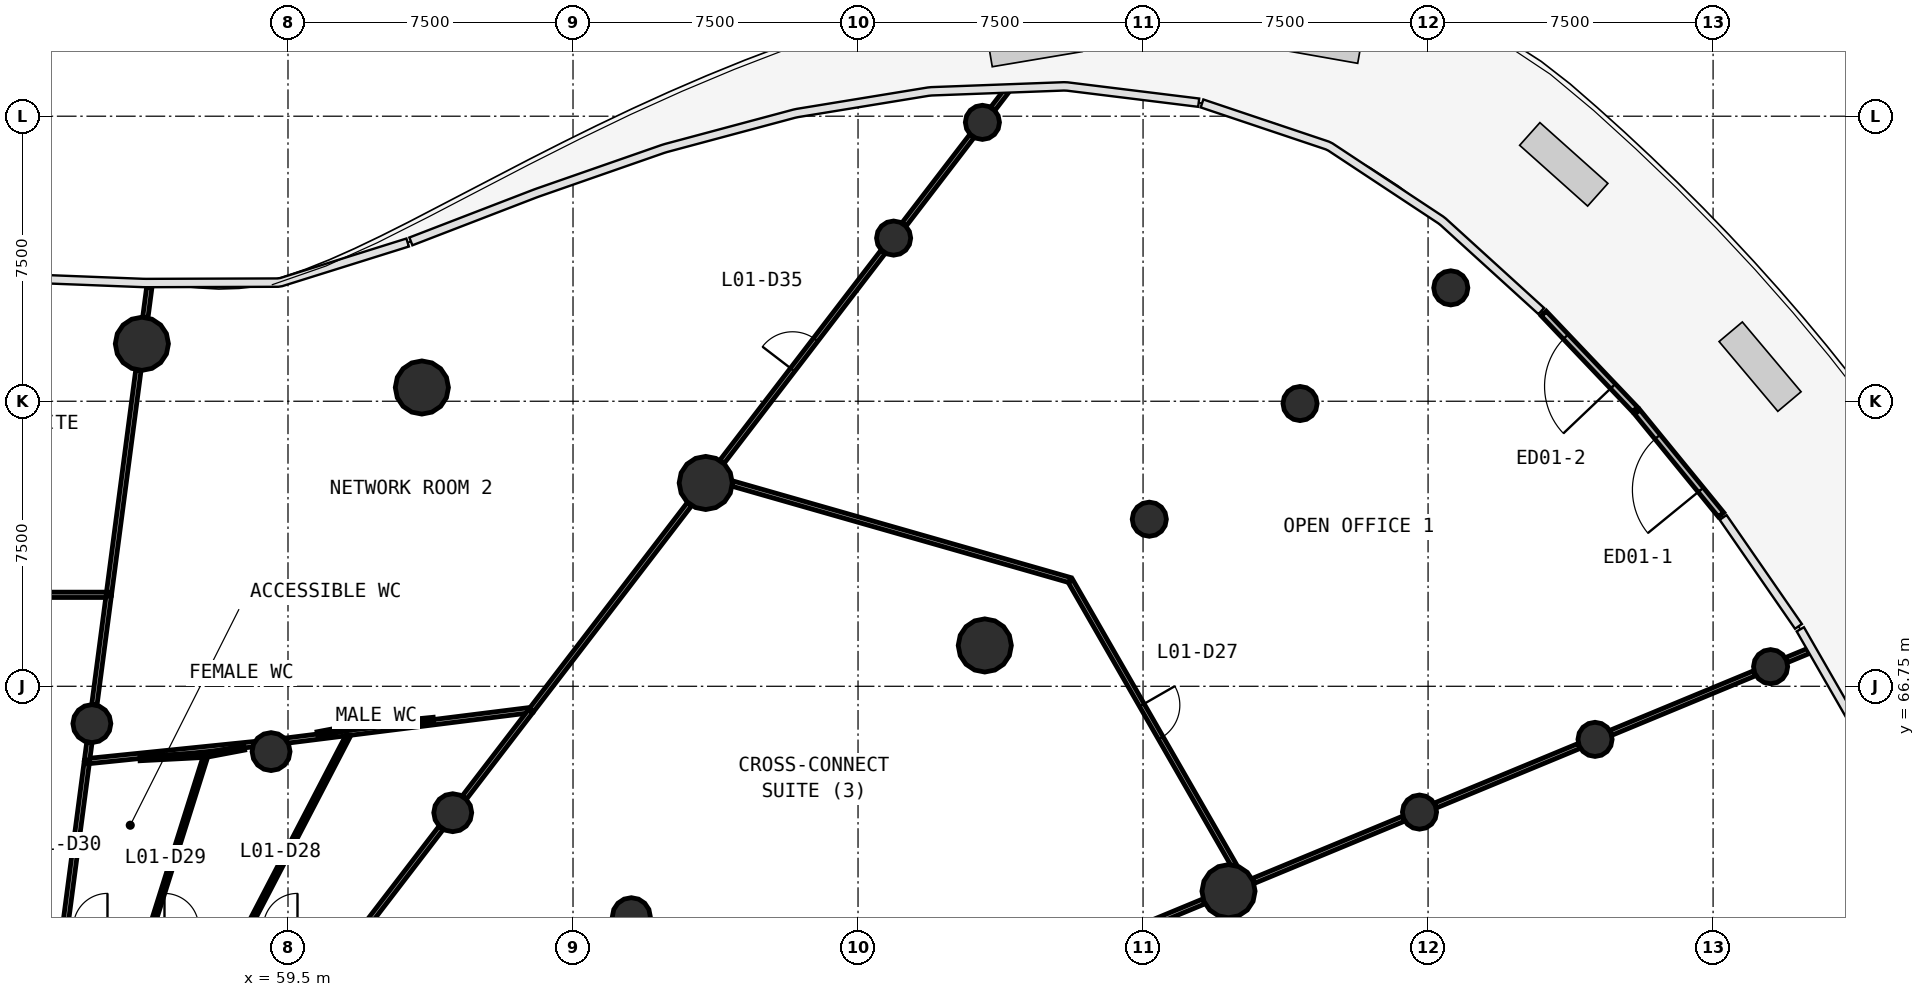
"""IFC4 building model, lengths in metres.
Left out: names, types, materials, properties, quantities, classifications, styles, units other than length and angle.
Written with IfcOpenShell. Run it as: python <this file> out.ifc"""

import sys

from ifc_helpers import new_model, si_unit, direction, frame, frame_2d, origin, origin_2d, place, context, subcontext, project, spatial, rectangle, circle, extrude, source, transform, mapped, element, fill, save


model = new_model("IFC4")
c1 = context("Model", 3, precision=1e-05, world=origin(), true_north=direction((0.0, 1.0)))
c2 = subcontext(c1, "Body", "Model", "MODEL_VIEW")
j1 = project(units=[si_unit("LENGTHUNIT", "METRE"), si_unit("PLANEANGLEUNIT", "RADIAN")], contexts=[c1])
p1 = place(None, origin())
s1 = spatial("IfcSite", under=j1, at=p1, CompositionType="ELEMENT")
p2 = place(p1, origin())
s2 = spatial("IfcBuilding", under=s1, at=p2, CompositionType="ELEMENT")
p3 = place(p2, frame((0.0, 0.0, 5.0)))
s3 = spatial("IfcBuildingStorey", under=s2, at=p3, CompositionType="ELEMENT", Elevation=5.0)
m1 = source(origin(), c2, "Body", "SweptSolid", [
    extrude(circle(Radius=0.7, at=origin_2d()), origin(), (0.0, 0.0, 1.0), 4.4),
])
for number, where, z_axis, x_axis in (
    (1, (84.249, 61.358, 0.0), (0.0, 0.0, 1.0), (1.0, 0.0, 0.0)),
    (2, (77.836, 67.824, 0.0), (0.0, 0.0, 1.0), (1.0, 0.0, 0.0)),
    (3, (70.492, 72.1, 0.0), (0.0, 0.0, 1.0), (1.0, 0.0, 0.0)),
    (4, (63.023, 74.611, 0.0), (0.0, 0.0, 1.0), (1.0, 0.0, 0.0)),
    (5, (55.655, 75.761, 0.0), (0.0, 0.0, 1.0), (1.0, 0.0, 0.0)),
):
    element("IfcColumn", number, at=place(p3, frame(where, z_axis=z_axis, x_axis=x_axis)), inside=s3, PredefinedType="COLUMN", context=c2, shape_type="MappedRepresentation", body=[
        mapped(m1, transform((0.0, 0.0, 0.0), scale=1.0)),
    ])
m2 = source(origin(), c2, "Body", "SweptSolid", [
    extrude(circle(Radius=0.5, at=origin_2d()), origin(), (0.0, 0.0, 1.0), 4.4),
])
for number, where, z_axis, x_axis in (
    (6, (68.535, 60.688, 0.0), (0.0, 0.0, 1.0), (1.0, 0.0, 0.0)),
    (7, (63.835, 63.424, 0.0), (0.0, 0.0, 1.0), (1.0, 0.0, 0.0)),
    (8, (59.055, 65.031, 0.0), (0.0, 0.0, 1.0), (1.0, 0.0, 0.0)),
    (9, (54.339, 65.767, 0.0), (0.0, 0.0, 1.0), (1.0, 0.0, 0.0)),
):
    element("IfcColumn", number, at=place(p3, frame(where, z_axis=z_axis, x_axis=x_axis)), inside=s3, PredefinedType="COLUMN", context=c2, shape_type="MappedRepresentation", body=[
        mapped(m2, transform((0.0, 0.0, 0.0), scale=1.0)),
    ])
m3 = source(origin(), c2, "Body", "SweptSolid", [
    extrude(circle(Radius=0.45, at=origin_2d()), origin(), (0.0, 0.0, 1.0), 4.05),
])
for number, where, z_axis, x_axis in (
    (10, (98.513, 67.266, 0.0), (0.0, 0.0, 1.0), (1.0, 0.0, 0.0)),
    (11, (90.098, 77.233, 0.0), (0.0, 0.0, 1.0), (1.0, 0.0, 0.0)),
    (12, (77.773, 81.588, 0.0), (0.0, 0.0, 1.0), (1.0, 0.0, 0.0)),
):
    element("IfcColumn", number, at=place(p3, frame(where, z_axis=z_axis, x_axis=x_axis)), inside=s3, PredefinedType="COLUMN", context=c2, shape_type="MappedRepresentation", body=[
        mapped(m3, transform((0.0, 0.0, 0.0), scale=1.0)),
    ])
m4 = source(origin(), c2, "Body", "SweptSolid", [
    extrude(circle(Radius=0.45, at=origin_2d()), origin(), (0.0, 0.0, 1.0), 4.4),
])
for number, where, z_axis, x_axis in (
    (13, (93.894, 65.353, 0.0), (0.0, 0.0, 1.0), (1.0, 0.0, 0.0)),
    (14, (86.131, 74.19, 0.0), (0.0, 0.0, 1.0), (1.0, 0.0, 0.0)),
    (15, (75.436, 78.543, 0.0), (0.0, 0.0, 1.0), (1.0, 0.0, 0.0)),
    (16, (89.275, 63.44, 0.0), (0.0, 0.0, 1.0), (1.0, 0.0, 0.0)),
    (17, (82.165, 71.146, 0.0), (0.0, 0.0, 1.0), (1.0, 0.0, 0.0)),
):
    element("IfcColumn", number, at=place(p3, frame(where, z_axis=z_axis, x_axis=x_axis)), inside=s3, PredefinedType="COLUMN", context=c2, shape_type="MappedRepresentation", body=[
        mapped(m4, transform((0.0, 0.0, 0.0), scale=1.0)),
    ])
p4 = place(p3, frame((97.21, 71.265, 0.0), z_axis=(0.0, 0.0, 1.0), x_axis=(-0.632333608818, 0.77469620314, 0.0)))
e18 = element("IfcWall", 18, at=p4, inside=s3, PredefinedType="STANDARD", context=c2, shape_type="SweptSolid", body=[
    extrude(rectangle(XDim=3.486, YDim=0.18, at=frame_2d((1.743, 0.0))), origin(), (0.0, 0.0, 1.0), 4.05),
])
p5 = place(p4, frame((0.843, 0.0, 0.0)))
e19 = element("IfcOpeningElement", 19, at=p5, cuts=e18, PredefinedType="OPENING", context=c2, shape_type="SweptSolid", body=[
    extrude(rectangle(XDim=1.8, YDim=2.4, at=frame_2d((0.9, 1.2))), frame((0.0, 0.1, 0.0), z_axis=(0.0, -1.0, 0.0), x_axis=(1.0, 0.0, 0.0)), (0.0, 0.0, 1.0), 0.2),
])
p6 = place(p3, frame((94.946, 74.033, 0.0), z_axis=(0.0, 0.0, 1.0), x_axis=(-0.689168934046, 0.724600704075, 0.0)))
e20 = element("IfcWall", 20, at=p6, inside=s3, PredefinedType="STANDARD", context=c2, shape_type="SweptSolid", body=[
    extrude(rectangle(XDim=3.487, YDim=0.18, at=frame_2d((1.743, 0.0))), origin(), (0.0, 0.0, 1.0), 4.05),
])
p7 = place(p6, frame((0.843, 0.0, 0.0)))
e21 = element("IfcOpeningElement", 21, at=p7, cuts=e20, PredefinedType="OPENING", context=c2, shape_type="SweptSolid", body=[
    extrude(rectangle(XDim=1.8, YDim=2.4, at=frame_2d((0.9, 1.2))), frame((0.0, 0.1, 0.0), z_axis=(0.0, -1.0, 0.0), x_axis=(1.0, 0.0, 0.0)), (0.0, 0.0, 1.0), 0.2),
])
p8 = place(p3, frame((80.076, 69.544, 0.0), z_axis=(0.0, 0.0, 1.0), x_axis=(-0.961447102661, 0.27498994306, 0.0)))
e22 = element("IfcWall", 22, at=p8, inside=s3, PredefinedType="PARTITIONING", context=c2, shape_type="SweptSolid", body=[
    extrude(rectangle(XDim=9.236, YDim=0.14, at=frame_2d((4.618, 0.0))), origin(), (0.0, 0.0, 1.0), 3.25),
])
p9 = place(p3, frame((80.091, 69.518, 0.0), z_axis=(0.0, 0.0, 1.0), x_axis=(0.498474851257, -0.866904160023, 0.0)))
e23 = element("IfcWall", 23, at=p9, inside=s3, PredefinedType="PARTITIONING", context=c2, shape_type="SweptSolid", body=[
    extrude(rectangle(XDim=8.615, YDim=0.14, at=frame_2d((4.308, 0.0))), origin(), (0.0, 0.0, 1.0), 3.25),
])
p10 = place(p9, frame((3.765, 0.0, 0.0)))
e24 = element("IfcOpeningElement", 24, at=p10, cuts=e23, PredefinedType="OPENING", context=c2, shape_type="SweptSolid", body=[
    extrude(rectangle(XDim=1.0, YDim=2.1, at=frame_2d((0.5, 1.05))), frame((0.0, 0.08, 0.0), z_axis=(0.0, -1.0, 0.0), x_axis=(1.0, 0.0, 0.0)), (0.0, 0.0, 1.0), 0.16),
])
p11 = place(p3, frame((70.921, 72.658, 0.0), z_axis=(0.0, 0.0, 1.0), x_axis=(0.608788506125, 0.793332562555, 0.0)))
e25 = element("IfcWall", 25, at=p11, inside=s3, PredefinedType="PARTITIONING", context=c2, shape_type="SweptSolid", body=[
    extrude(rectangle(XDim=6.963, YDim=0.14, at=frame_2d((3.481, 0.0))), origin(), (0.0, 0.0, 1.0), 3.25),
])
p12 = place(p11, frame((3.05, 0.0, 0.0)))
e26 = element("IfcOpeningElement", 26, at=p12, cuts=e25, PredefinedType="OPENING", context=c2, shape_type="SweptSolid", body=[
    extrude(rectangle(XDim=1.0, YDim=2.1, at=frame_2d((0.5, 1.05))), frame((0.0, 0.08, 0.0), z_axis=(0.0, -1.0, 0.0), x_axis=(1.0, 0.0, 0.0)), (0.0, 0.0, 1.0), 0.16),
])
p13 = place(p3, frame((65.909, 66.127, 0.0), z_axis=(0.0, 0.0, 1.0), x_axis=(0.608773229352, 0.79334428543, 0.0)))
e27 = element("IfcWall", 27, at=p13, inside=s3, PredefinedType="PARTITIONING", context=c2, shape_type="SweptSolid", body=[
    extrude(rectangle(XDim=6.824, YDim=0.14, at=frame_2d((3.412, 0.0))), origin(), (0.0, 0.0, 1.0), 3.25),
])
p14 = place(p3, frame((65.88, 66.124, 0.0), z_axis=(0.0, 0.0, 1.0), x_axis=(-0.992269737838, -0.124099828249, 0.0)))
e28 = element("IfcWall", 28, at=p14, inside=s3, PredefinedType="PARTITIONING", context=c2, shape_type="SweptSolid", body=[
    extrude(rectangle(XDim=6.463, YDim=0.14, at=frame_2d((3.231, 0.0))), origin(), (0.0, 0.0, 1.0), 3.25),
])
p15 = place(p3, frame((54.785, 69.157, 0.0), z_axis=(0.0, 0.0, 1.0), x_axis=(0.130523417799, 0.991445226629, 0.0)))
e29 = element("IfcWall", 29, at=p15, inside=s3, PredefinedType="PARTITIONING", context=c2, shape_type="SweptSolid", body=[
    extrude(rectangle(XDim=5.958, YDim=0.14, at=frame_2d((2.979, 0.0))), origin(), (0.0, 0.0, 1.0), 3.25),
])
p16 = place(p3, frame((49.245, 69.157, 0.0), z_axis=(0.0, 0.0, 1.0), x_axis=(1.0, 0.0, 0.0)))
e30 = element("IfcWall", 30, at=p16, inside=s3, PredefinedType="PARTITIONING", context=c2, shape_type="SweptSolid", body=[
    extrude(rectangle(XDim=5.511, YDim=0.14, at=frame_2d((2.755, 0.0))), origin(), (0.0, 0.0, 1.0), 3.25),
])
p17 = place(p16, frame((2.261, 0.0, 0.0)))
e31 = element("IfcOpeningElement", 31, at=p17, cuts=e30, PredefinedType="OPENING", context=c2, shape_type="SweptSolid", body=[
    extrude(rectangle(XDim=1.0, YDim=2.1, at=frame_2d((0.5, 1.05))), frame((0.0, 0.08, 0.0), z_axis=(0.0, -1.0, 0.0), x_axis=(1.0, 0.0, 0.0)), (0.0, 0.0, 1.0), 0.16),
])
p18 = place(p3, frame((78.669, 59.047, 0.0), z_axis=(0.0, 0.0, 1.0), x_axis=(0.923891330959, 0.382654947151, 0.0)))
e32 = element("IfcWall", 32, at=p18, inside=s3, PredefinedType="PARTITIONING", context=c2, shape_type="SweptSolid", body=[
    extrude(rectangle(XDim=5.334, YDim=0.14, at=frame_2d((2.667, 0.0))), origin(), (0.0, 0.0, 1.0), 3.25),
])
p19 = place(p3, frame((53.644, 60.49, 0.0), z_axis=(0.0, 0.0, 1.0), x_axis=(0.130555258319, 0.991441034316, 0.0)))
e33 = element("IfcWall", 33, at=p19, inside=s3, PredefinedType="PARTITIONING", context=c2, shape_type="SweptSolid", body=[
    extrude(rectangle(XDim=4.325, YDim=0.14, at=frame_2d((2.163, 0.0))), origin(), (0.0, 0.0, 1.0), 3.25),
])
p20 = place(p3, frame((58.588, 65.225, 0.0), z_axis=(0.0, 0.0, 1.0), x_axis=(-0.994844610693, -0.101411047601, 0.0)))
e34 = element("IfcWall", 34, at=p20, inside=s3, PredefinedType="PARTITIONING", context=c2, shape_type="SweptSolid", body=[
    extrude(rectangle(XDim=4.372, YDim=0.14, at=frame_2d((2.186, 0.0))), origin(), (0.0, 0.0, 1.0), 3.25),
])
p21 = place(p3, frame((84.9, 61.628, 0.0), z_axis=(0.0, 0.0, 1.0), x_axis=(0.923871522787, 0.382702768979, 0.0)))
e35 = element("IfcWall", 35, at=p21, inside=s3, PredefinedType="PARTITIONING", context=c2, shape_type="SweptSolid", body=[
    extrude(rectangle(XDim=4.28, YDim=0.14, at=frame_2d((2.14, 0.0))), origin(), (0.0, 0.0, 1.0), 3.25),
])
p22 = place(p3, frame((94.314, 65.527, 0.0), z_axis=(0.0, 0.0, 1.0), x_axis=(0.923874959136, 0.382694473284, 0.0)))
e36 = element("IfcWall", 36, at=p22, inside=s3, PredefinedType="PARTITIONING", context=c2, shape_type="SweptSolid", body=[
    extrude(rectangle(XDim=4.09, YDim=0.14, at=frame_2d((2.045, 0.0))), origin(), (0.0, 0.0, 1.0), 3.25),
])
p23 = place(p3, frame((89.695, 63.614, 0.0), z_axis=(0.0, 0.0, 1.0), x_axis=(0.92386621601, 0.382715579661, 0.0)))
e37 = element("IfcWall", 37, at=p23, inside=s3, PredefinedType="PARTITIONING", context=c2, shape_type="SweptSolid", body=[
    extrude(rectangle(XDim=4.09, YDim=0.14, at=frame_2d((2.045, 0.0))), origin(), (0.0, 0.0, 1.0), 3.25),
])
p24 = place(p3, frame((61.584, 60.49, 0.0), z_axis=(0.0, 0.0, 1.0), x_axis=(0.60874605662, 0.793365135703, 0.0)))
e38 = element("IfcWall", 38, at=p24, inside=s3, PredefinedType="PARTITIONING", context=c2, shape_type="SweptSolid", body=[
    extrude(rectangle(XDim=3.194, YDim=0.14, at=frame_2d((1.597, 0.0))), origin(), (0.0, 0.0, 1.0), 3.25),
])
p25 = place(p3, frame((75.713, 78.903, 0.0), z_axis=(0.0, 0.0, 1.0), x_axis=(0.608804147927, 0.793320559085, 0.0)))
e39 = element("IfcWall", 39, at=p25, inside=s3, PredefinedType="PARTITIONING", context=c2, shape_type="SweptSolid", body=[
    extrude(rectangle(XDim=2.929, YDim=0.14, at=frame_2d((1.465, 0.0))), origin(), (0.0, 0.0, 1.0), 3.25),
])
p26 = place(p3, frame((54.405, 66.267, 0.0), z_axis=(0.0, 0.0, 1.0), x_axis=(0.130511436872, 0.99144680384, 0.0)))
e40 = element("IfcWall", 40, at=p26, inside=s3, PredefinedType="PARTITIONING", context=c2, shape_type="SweptSolid", body=[
    extrude(rectangle(XDim=2.885, YDim=0.14, at=frame_2d((1.442, 0.0))), origin(), (0.0, 0.0, 1.0), 3.25),
])
p27 = place(p3, frame((64.142, 63.824, 0.0), z_axis=(0.0, 0.0, 1.0), x_axis=(0.608770075861, 0.793346705253, 0.0)))
e41 = element("IfcWall", 41, at=p27, inside=s3, PredefinedType="PARTITIONING", context=c2, shape_type="SweptSolid", body=[
    extrude(rectangle(XDim=2.861, YDim=0.14, at=frame_2d((1.431, 0.0))), origin(), (0.0, 0.0, 1.0), 3.25),
])
p28 = place(p3, frame((55.747, 76.46, 0.0), z_axis=(0.0, 0.0, 1.0), x_axis=(0.130598952658, 0.991435279564, 0.0)))
e42 = element("IfcWall", 42, at=p28, inside=s3, PredefinedType="PARTITIONING", context=c2, shape_type="SweptSolid", body=[
    extrude(rectangle(XDim=0.787, YDim=0.14, at=frame_2d((0.394, 0.0))), origin(), (0.0, 0.0, 1.0), 3.25),
])
p29 = place(p3, frame((98.934, 67.44, 0.0), z_axis=(0.0, 0.0, 1.0), x_axis=(0.923725485177, 0.383055124016, 0.0)))
e43 = element("IfcWall", 43, at=p29, inside=s3, PredefinedType="PARTITIONING", context=c2, shape_type="SweptSolid", body=[
    extrude(rectangle(XDim=0.634, YDim=0.14, at=frame_2d((0.317, 0.0))), origin(), (0.0, 0.0, 1.0), 3.25),
])
p30 = place(p3, frame((78.05, 81.948, 0.0), z_axis=(0.0, 0.0, 1.0), x_axis=(0.608753749501, 0.793359232926, 0.0)))
e44 = element("IfcWall", 44, at=p30, inside=s3, PredefinedType="PARTITIONING", context=c2, shape_type="SweptSolid", body=[
    extrude(rectangle(XDim=0.604, YDim=0.14, at=frame_2d((0.302, 0.0))), origin(), (0.0, 0.0, 1.0), 3.25),
])
p31 = place(p3, frame((54.213, 64.808, 0.0), z_axis=(0.0, 0.0, 1.0), x_axis=(0.130263517927, 0.991479407702, 0.0)))
e45 = element("IfcWall", 45, at=p31, inside=s3, PredefinedType="PARTITIONING", context=c2, shape_type="SweptSolid", body=[
    extrude(rectangle(XDim=0.463, YDim=0.14, at=frame_2d((0.231, 0.0))), origin(), (0.0, 0.0, 1.0), 3.25),
])
p32 = place(p3, frame((58.502, 60.49, 0.0), z_axis=(0.0, 0.0, 1.0), x_axis=(0.461744214497, 0.887013123002, 0.0)))
e46 = element("IfcWall", 46, at=p32, inside=s3, PredefinedType="PARTITIONING", context=c2, shape_type="SweptSolid", body=[
    extrude(rectangle(XDim=5.596, YDim=0.12, at=frame_2d((2.798, 0.0))), origin(), (0.0, 0.0, 1.0), 3.25),
])
p33 = place(p3, frame((55.938, 60.49, 0.0), z_axis=(0.0, 0.0, 1.0), x_axis=(0.300723137203, 0.95371148402, 0.0)))
e47 = element("IfcWall", 47, at=p33, inside=s3, PredefinedType="PARTITIONING", context=c2, shape_type="SweptSolid", body=[
    extrude(rectangle(XDim=4.666, YDim=0.12, at=frame_2d((2.333, 0.0))), origin(), (0.0, 0.0, 1.0), 3.25),
])
p34 = place(p3, frame((63.328, 65.875, 0.0), z_axis=(0.0, 0.0, 1.0), x_axis=(-0.995247178859, -0.097380968234, 0.0)))
e48 = element("IfcWall", 48, at=p34, inside=s3, PredefinedType="PARTITIONING", context=c2, shape_type="SweptSolid", body=[
    extrude(rectangle(XDim=2.141, YDim=0.12, at=frame_2d((1.071, 0.0))), origin(), (0.0, 0.0, 1.0), 3.25),
])
p35 = place(p3, frame((57.277, 64.937, 0.0), z_axis=(0.0, 0.0, 1.0), x_axis=(-0.998675207723, -0.051457064418, 0.0)))
e49 = element("IfcWall", 49, at=p35, inside=s3, PredefinedType="PARTITIONING", context=c2, shape_type="SweptSolid", body=[
    extrude(rectangle(XDim=1.675, YDim=0.12, at=frame_2d((0.837, 0.0))), origin(), (0.0, 0.0, 1.0), 3.25),
])
p36 = place(p3, frame((61.167, 65.661, 0.0), z_axis=(0.0, 0.0, 1.0), x_axis=(-0.982722635862, -0.18508436175, 0.0)))
e50 = element("IfcWall", 50, at=p36, inside=s3, PredefinedType="PARTITIONING", context=c2, shape_type="SweptSolid", body=[
    extrude(rectangle(XDim=0.907, YDim=0.12, at=frame_2d((0.454, 0.0))), origin(), (0.0, 0.0, 1.0), 3.25),
])
p37 = place(p3, frame((58.349, 65.13, 0.0), z_axis=(0.0, 0.0, 1.0), x_axis=(-0.982618634889, -0.185635714153, 0.0)))
e51 = element("IfcWall", 51, at=p37, inside=s3, PredefinedType="PARTITIONING", context=c2, shape_type="SweptSolid", body=[
    extrude(rectangle(XDim=0.996, YDim=0.12, at=frame_2d((0.498, 0.0))), origin(), (0.0, 0.0, 1.0), 3.25),
])
m5 = source(origin(), c2, "Body", "SweptSolid", [
    extrude(rectangle(XDim=1.8, YDim=2.4, at=frame_2d((0.9, 1.2))), frame((0.0, 0.025, 0.0), z_axis=(0.0, -1.0, 0.0), x_axis=(1.0, 0.0, 0.0)), (0.0, 0.0, 1.0), 0.05),
])
p38 = place(p5, origin())
e52 = element("IfcDoor", 52, at=p38, inside=s3, OperationType="DOUBLE_DOOR_SINGLE_SWING", PredefinedType="DOOR", context=c2, shape_type="MappedRepresentation", body=[
    mapped(m5, transform((0.0, 0.0, 0.0), scale=1.0)),
])
fill(e19, e52)
p39 = place(p7, origin())
e53 = element("IfcDoor", 53, at=p39, inside=s3, OperationType="DOUBLE_DOOR_SINGLE_SWING", PredefinedType="DOOR", context=c2, shape_type="MappedRepresentation", body=[
    mapped(m5, transform((0.0, 0.0, 0.0), scale=1.0)),
])
fill(e21, e53)
m6 = source(origin(), c2, "Body", "SweptSolid", [
    extrude(rectangle(XDim=1.0, YDim=2.1, at=frame_2d((0.5, 1.05))), frame((0.0, 0.025, 0.0), z_axis=(0.0, -1.0, 0.0), x_axis=(1.0, 0.0, 0.0)), (0.0, 0.0, 1.0), 0.05),
])
p40 = place(p10, origin())
e54 = element("IfcDoor", 54, at=p40, inside=s3, OperationType="SINGLE_SWING_LEFT", PredefinedType="DOOR", context=c2, shape_type="MappedRepresentation", body=[
    mapped(m6, transform((0.0, 0.0, 0.0), scale=1.0)),
])
fill(e24, e54)
p41 = place(p12, origin())
e55 = element("IfcDoor", 55, at=p41, inside=s3, OperationType="SINGLE_SWING_LEFT", PredefinedType="DOOR", context=c2, shape_type="MappedRepresentation", body=[
    mapped(m6, transform((0.0, 0.0, 0.0), scale=1.0)),
])
fill(e26, e55)
save(model, sys.argv[1])
